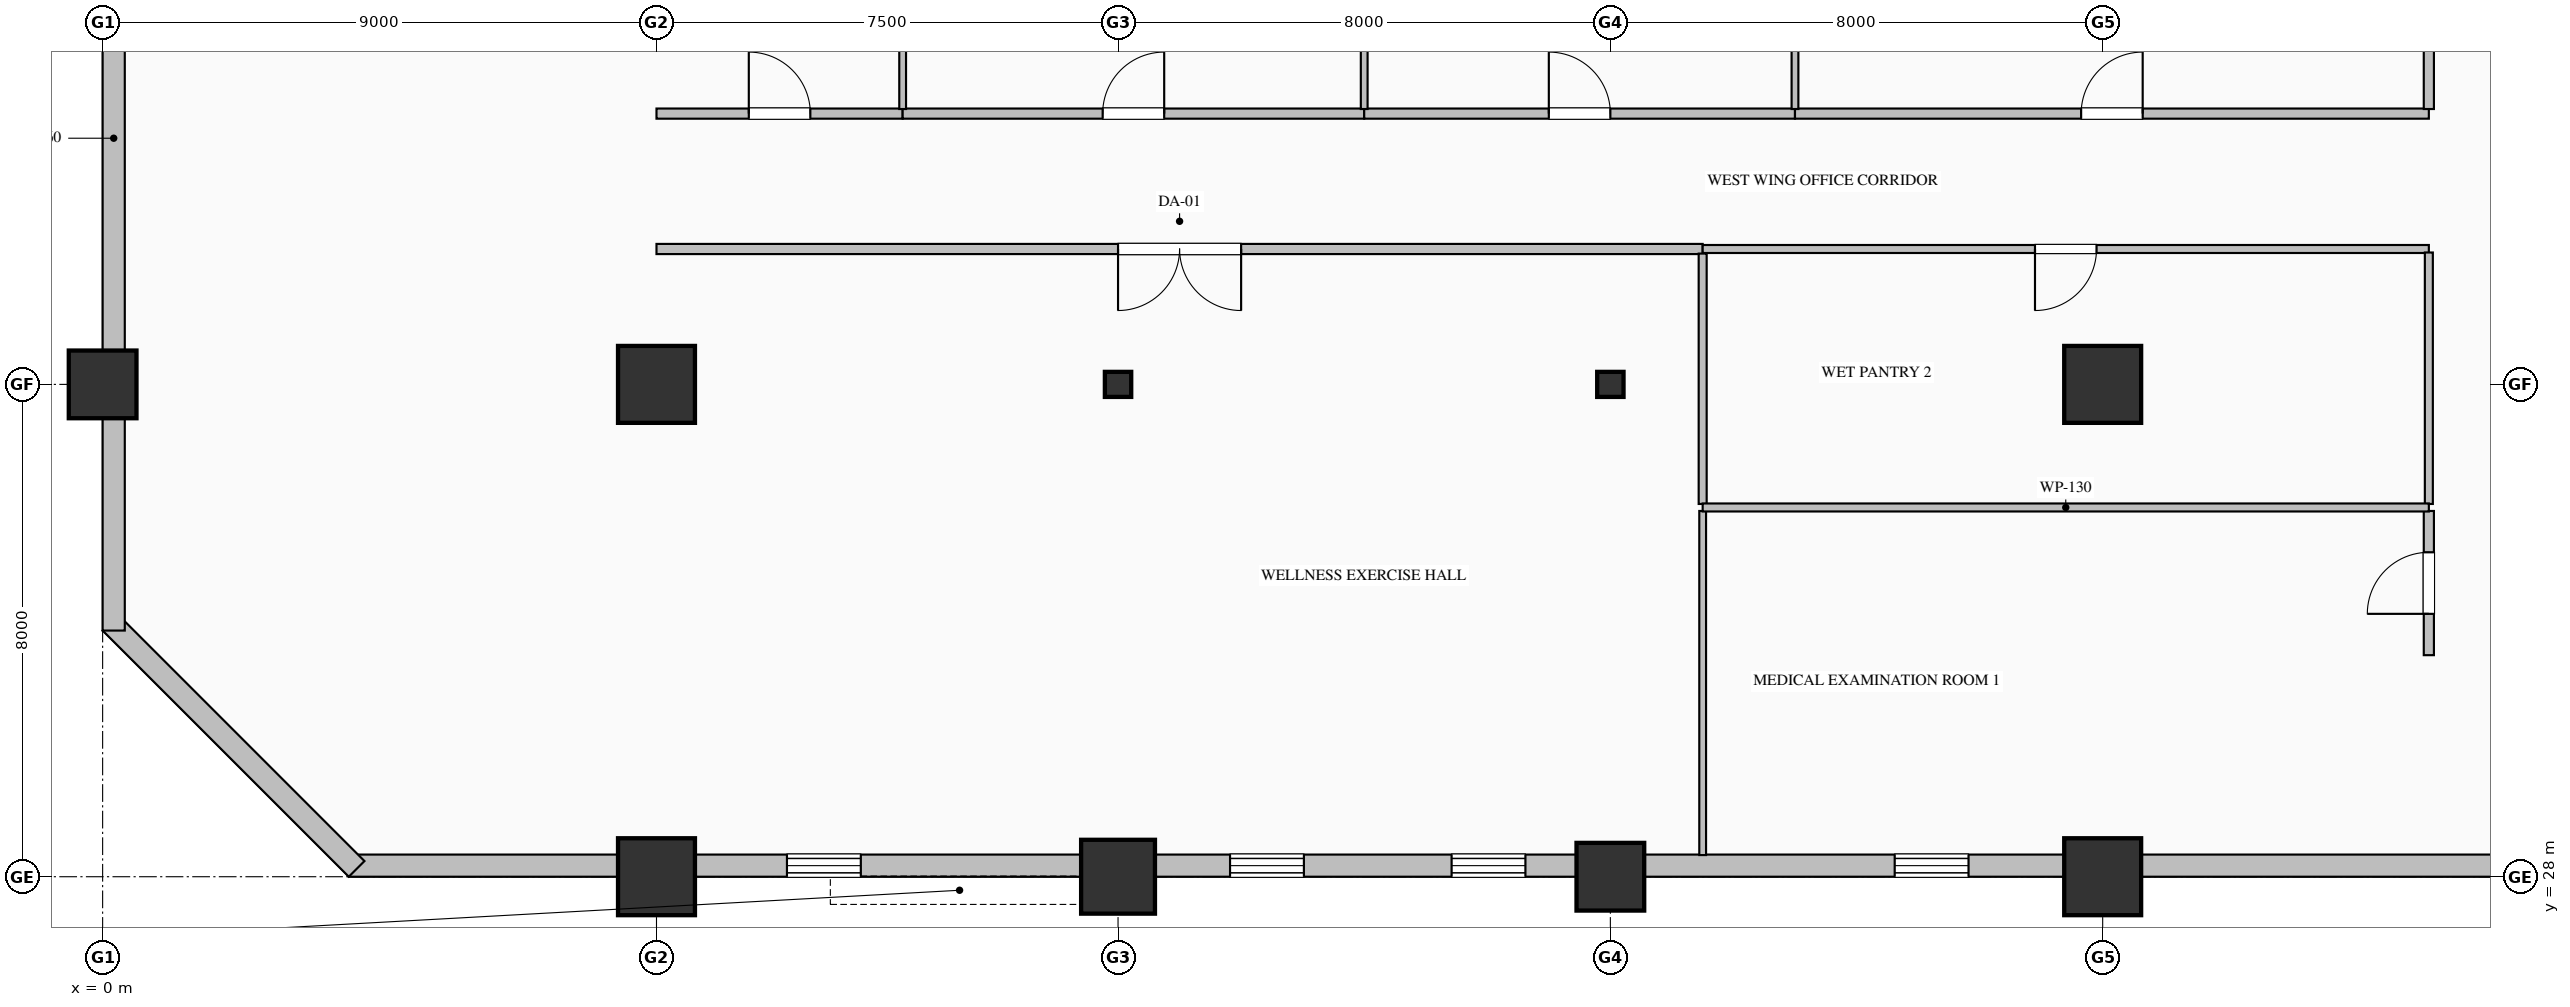
"""IFC4 building model, lengths in metres.
Left out: names, types, materials, properties, quantities, classifications, styles, units other than length and angle.
Written with IfcOpenShell. Run it as: python <this file> out.ifc"""

import sys

from ifc_helpers import new_model, si_unit, direction, frame, frame_2d, origin, origin_2d, place, context, subcontext, project, spatial, rectangle, hollow_rectangle, hollow_circle, i_section, extrude, element, fill, save


model = new_model("IFC4")
c1 = context("Model", 3, precision=1e-05, world=origin(), true_north=direction((0.0, 1.0)))
c2 = subcontext(c1, "Body", "Model", "MODEL_VIEW")
j1 = project(units=[si_unit("LENGTHUNIT", "METRE"), si_unit("PLANEANGLEUNIT", "RADIAN")], contexts=[c1])
p1 = place(None, origin())
s1 = spatial("IfcSite", under=j1, at=p1, CompositionType="ELEMENT")
p2 = place(p1, origin())
s2 = spatial("IfcBuilding", under=s1, at=p2, CompositionType="ELEMENT")
p3 = place(p2, frame((0.0, 0.0, 88.2)))
s3 = spatial("IfcBuildingStorey", under=s2, at=p3, CompositionType="ELEMENT", Elevation=88.2)
p4 = place(p3, frame((0.0, 36.0, 0.0), z_axis=(0.0, 0.0, 1.0), x_axis=(1.0, 0.0, 0.0)))
e1 = element("IfcColumn", 1, at=p4, inside=s3, PredefinedType="COLUMN", context=c2, shape_type="SweptSolid", body=[
    extrude(hollow_rectangle(XDim=1.1, YDim=1.1, WallThickness=0.04, at=origin_2d()), origin(), (0.0, 0.0, 1.0), 4.0),
])
for number, where, z_axis, x_axis in (
    (2, (9.0, 28.0, 0.0), (0.0, 0.0, 1.0), (1.0, 0.0, 0.0)),
    (3, (9.0, 36.0, 0.0), (0.0, 0.0, 1.0), (1.0, 0.0, 0.0)),
):
    element("IfcColumn", number, at=place(p3, frame(where, z_axis=z_axis, x_axis=x_axis)), inside=s3, PredefinedType="COLUMN", context=c2, shape_type="SweptSolid", body=[
        extrude(hollow_rectangle(XDim=1.25, YDim=1.25, WallThickness=0.045, at=origin_2d()), origin(), (0.0, 0.0, 1.0), 4.0),
    ])
p5 = place(p3, frame((16.5, 28.0, 0.0), z_axis=(0.0, 0.0, 1.0), x_axis=(1.0, 0.0, 0.0)))
e4 = element("IfcColumn", 4, at=p5, inside=s3, PredefinedType="COLUMN", context=c2, shape_type="SweptSolid", body=[
    extrude(hollow_circle(Radius=0.6, WallThickness=0.04, at=origin_2d()), origin(), (0.0, 0.0, 1.0), 4.0),
])
p6 = place(p3, frame((16.5, 36.0, 0.0), z_axis=(0.0, 0.0, 1.0), x_axis=(1.0, 0.0, 0.0)))
e5 = element("IfcColumn", 5, at=p6, inside=s3, PredefinedType="COLUMN", context=c2, shape_type="SweptSolid", body=[
    extrude(i_section(OverallWidth=0.407, OverallDepth=0.428, WebThickness=0.02, FlangeThickness=0.035, FilletRadius=0.022, at=origin_2d()), origin(), (0.0, 0.0, 1.0), 4.0),
])
p7 = place(p3, frame((24.5, 28.0, 0.0), z_axis=(0.0, 0.0, 1.0), x_axis=(1.0, 0.0, 0.0)))
e6 = element("IfcColumn", 6, at=p7, inside=s3, PredefinedType="COLUMN", context=c2, shape_type="SweptSolid", body=[
    extrude(hollow_rectangle(XDim=1.1, YDim=1.1, WallThickness=0.04, at=origin_2d()), origin(), (0.0, 0.0, 1.0), 4.0),
])
p8 = place(p3, frame((24.5, 36.0, 0.0), z_axis=(0.0, 0.0, 1.0), x_axis=(1.0, 0.0, 0.0)))
e7 = element("IfcColumn", 7, at=p8, inside=s3, PredefinedType="COLUMN", context=c2, shape_type="SweptSolid", body=[
    extrude(i_section(OverallWidth=0.407, OverallDepth=0.428, WebThickness=0.02, FlangeThickness=0.035, FilletRadius=0.022, at=origin_2d()), origin(), (0.0, 0.0, 1.0), 4.0),
])
for number, where, z_axis, x_axis in (
    (8, (32.5, 28.0, 0.0), (0.0, 0.0, 1.0), (1.0, 0.0, 0.0)),
    (9, (32.5, 36.0, 0.0), (0.0, 0.0, 1.0), (1.0, 0.0, 0.0)),
):
    element("IfcColumn", number, at=place(p3, frame(where, z_axis=z_axis, x_axis=x_axis)), inside=s3, PredefinedType="COLUMN", context=c2, shape_type="SweptSolid", body=[
        extrude(hollow_rectangle(XDim=1.25, YDim=1.25, WallThickness=0.045, at=origin_2d()), origin(), (0.0, 0.0, 1.0), 4.0),
    ])
p9 = place(p3, frame((40.52, 28.18, 0.0), z_axis=(0.0, 0.0, 1.0), x_axis=(-1.0, 0.0, 0.0)))
e10 = element("IfcWall", 10, at=p9, inside=s3, PredefinedType="SOLIDWALL", context=c2, shape_type="SweptSolid", body=[
    extrude(rectangle(XDim=36.52, YDim=0.36, at=frame_2d((18.26, 0.0))), origin(), (0.0, 0.0, 1.0), 3.05),
])
p10 = place(p9, frame((10.2, 0.0, 0.7)))
e11 = element("IfcOpeningElement", 11, at=p10, cuts=e10, PredefinedType="OPENING", context=c2, shape_type="SweptSolid", body=[
    extrude(rectangle(XDim=1.2, YDim=1.85, at=frame_2d((0.6, 0.925))), frame((0.0, 0.19, 0.0), z_axis=(0.0, -1.0, 0.0), x_axis=(1.0, 0.0, 0.0)), (0.0, 0.0, 1.0), 0.38),
])
p11 = place(p9, frame((17.4, 0.0, 0.7)))
e12 = element("IfcOpeningElement", 12, at=p11, cuts=e10, PredefinedType="OPENING", context=c2, shape_type="SweptSolid", body=[
    extrude(rectangle(XDim=1.2, YDim=1.85, at=frame_2d((0.6, 0.925))), frame((0.0, 0.19, 0.0), z_axis=(0.0, -1.0, 0.0), x_axis=(1.0, 0.0, 0.0)), (0.0, 0.0, 1.0), 0.38),
])
p12 = place(p9, frame((21.0, 0.0, 0.7)))
e13 = element("IfcOpeningElement", 13, at=p12, cuts=e10, PredefinedType="OPENING", context=c2, shape_type="SweptSolid", body=[
    extrude(rectangle(XDim=1.2, YDim=1.85, at=frame_2d((0.6, 0.925))), frame((0.0, 0.19, 0.0), z_axis=(0.0, -1.0, 0.0), x_axis=(1.0, 0.0, 0.0)), (0.0, 0.0, 1.0), 0.38),
])
p13 = place(p9, frame((28.2, 0.0, 0.7)))
e14 = element("IfcOpeningElement", 14, at=p13, cuts=e10, PredefinedType="OPENING", context=c2, shape_type="SweptSolid", body=[
    extrude(rectangle(XDim=1.2, YDim=1.85, at=frame_2d((0.6, 0.925))), frame((0.0, 0.19, 0.0), z_axis=(0.0, -1.0, 0.0), x_axis=(1.0, 0.0, 0.0)), (0.0, 0.0, 1.0), 0.38),
])
p14 = place(p3, frame((4.127, 28.127, 0.0), z_axis=(0.0, 0.0, 1.0), x_axis=(-0.707106781187, 0.707106781187, 0.0)))
e15 = element("IfcWall", 15, at=p14, inside=s3, PredefinedType="SOLIDWALL", context=c2, shape_type="SweptSolid", body=[
    extrude(rectangle(XDim=5.657, YDim=0.36, at=frame_2d((2.828, 0.0))), origin(), (0.0, 0.0, 1.0), 3.75),
])
p15 = place(p3, frame((0.18, 32.0, 0.0), z_axis=(0.0, 0.0, 1.0), x_axis=(0.0, 1.0, 0.0)))
e16 = element("IfcWall", 16, at=p15, inside=s3, PredefinedType="SOLIDWALL", context=c2, shape_type="SweptSolid", body=[
    extrude(rectangle(XDim=16.0, YDim=0.36, at=frame_2d((8.0, 0.0))), origin(), (0.0, 0.0, 1.0), 3.25),
])
p16 = place(p3, frame((9.0, 40.4, 0.0), z_axis=(0.0, 0.0, 1.0), x_axis=(1.0, 0.0, 0.0)))
e17 = element("IfcWall", 17, at=p16, inside=s3, PredefinedType="PARTITIONING", context=c2, shape_type="SweptSolid", body=[
    extrude(rectangle(XDim=4.0, YDim=0.165, at=frame_2d((2.0, 0.0))), origin(), (0.0, 0.0, 1.0), 3.75),
])
p17 = place(p16, frame((1.5, 0.0, 0.0)))
e18 = element("IfcOpeningElement", 18, at=p17, cuts=e17, PredefinedType="OPENING", context=c2, shape_type="SweptSolid", body=[
    extrude(rectangle(XDim=1.0, YDim=2.15, at=frame_2d((0.5, 1.075))), frame((0.0, 0.093, 0.0), z_axis=(0.0, -1.0, 0.0), x_axis=(1.0, 0.0, 0.0)), (0.0, 0.0, 1.0), 0.185),
])
p18 = place(p3, frame((13.0, 40.4, 0.0), z_axis=(0.0, 0.0, 1.0), x_axis=(1.0, 0.0, 0.0)))
e19 = element("IfcWall", 19, at=p18, inside=s3, PredefinedType="PARTITIONING", context=c2, shape_type="SweptSolid", body=[
    extrude(rectangle(XDim=7.5, YDim=0.165, at=frame_2d((3.75, 0.0))), origin(), (0.0, 0.0, 1.0), 3.75),
])
p19 = place(p18, frame((3.25, 0.0, 0.0)))
e20 = element("IfcOpeningElement", 20, at=p19, cuts=e19, PredefinedType="OPENING", context=c2, shape_type="SweptSolid", body=[
    extrude(rectangle(XDim=1.0, YDim=2.15, at=frame_2d((0.5, 1.075))), frame((0.0, 0.093, 0.0), z_axis=(0.0, -1.0, 0.0), x_axis=(1.0, 0.0, 0.0)), (0.0, 0.0, 1.0), 0.185),
])
p20 = place(p3, frame((20.5, 40.4, 0.0), z_axis=(0.0, 0.0, 1.0), x_axis=(1.0, 0.0, 0.0)))
e21 = element("IfcWall", 21, at=p20, inside=s3, PredefinedType="PARTITIONING", context=c2, shape_type="SweptSolid", body=[
    extrude(rectangle(XDim=7.0, YDim=0.165, at=frame_2d((3.5, 0.0))), origin(), (0.0, 0.0, 1.0), 3.75),
])
p21 = place(p20, frame((3.0, 0.0, 0.0)))
e22 = element("IfcOpeningElement", 22, at=p21, cuts=e21, PredefinedType="OPENING", context=c2, shape_type="SweptSolid", body=[
    extrude(rectangle(XDim=1.0, YDim=2.15, at=frame_2d((0.5, 1.075))), frame((0.0, 0.093, 0.0), z_axis=(0.0, -1.0, 0.0), x_axis=(1.0, 0.0, 0.0)), (0.0, 0.0, 1.0), 0.185),
])
p22 = place(p3, frame((27.5, 40.4, 0.0), z_axis=(0.0, 0.0, 1.0), x_axis=(1.0, 0.0, 0.0)))
e23 = element("IfcWall", 23, at=p22, inside=s3, PredefinedType="PARTITIONING", context=c2, shape_type="SweptSolid", body=[
    extrude(rectangle(XDim=10.3, YDim=0.165, at=frame_2d((5.15, 0.0))), origin(), (0.0, 0.0, 1.0), 3.75),
])
p23 = place(p22, frame((4.65, 0.0, 0.0)))
e24 = element("IfcOpeningElement", 24, at=p23, cuts=e23, PredefinedType="OPENING", context=c2, shape_type="SweptSolid", body=[
    extrude(rectangle(XDim=1.0, YDim=2.15, at=frame_2d((0.5, 1.075))), frame((0.0, 0.093, 0.0), z_axis=(0.0, -1.0, 0.0), x_axis=(1.0, 0.0, 0.0)), (0.0, 0.0, 1.0), 0.185),
])
p24 = place(p3, frame((26.0, 38.2, 0.0), z_axis=(0.0, 0.0, 1.0), x_axis=(-1.0, 0.0, 0.0)))
e25 = element("IfcWall", 25, at=p24, inside=s3, PredefinedType="PARTITIONING", context=c2, shape_type="SweptSolid", body=[
    extrude(rectangle(XDim=17.0, YDim=0.165, at=frame_2d((8.5, 0.0))), origin(), (0.0, 0.0, 1.0), 3.75),
])
p25 = place(p24, frame((7.5, 0.0, 0.0)))
e26 = element("IfcOpeningElement", 26, at=p25, cuts=e25, PredefinedType="OPENING", context=c2, shape_type="SweptSolid", body=[
    extrude(rectangle(XDim=2.0, YDim=2.4, at=frame_2d((1.0, 1.2))), frame((0.0, 0.093, 0.0), z_axis=(0.0, -1.0, 0.0), x_axis=(1.0, 0.0, 0.0)), (0.0, 0.0, 1.0), 0.185),
])
p26 = place(p3, frame((37.8, 38.2, 0.0), z_axis=(0.0, 0.0, 1.0), x_axis=(-1.0, 0.0, 0.0)))
e27 = element("IfcWall", 27, at=p26, inside=s3, PredefinedType="PARTITIONING", context=c2, shape_type="SweptSolid", body=[
    extrude(rectangle(XDim=11.8, YDim=0.13, at=frame_2d((5.9, 0.0))), origin(), (0.0, 0.0, 1.0), 3.75),
])
p27 = place(p26, frame((5.4, 0.0, 0.0)))
e28 = element("IfcOpeningElement", 28, at=p27, cuts=e27, PredefinedType="OPENING", context=c2, shape_type="SweptSolid", body=[
    extrude(rectangle(XDim=1.0, YDim=2.15, at=frame_2d((0.5, 1.075))), frame((0.0, 0.075, 0.0), z_axis=(0.0, -1.0, 0.0), x_axis=(1.0, 0.0, 0.0)), (0.0, 0.0, 1.0), 0.15),
])
p28 = place(p3, frame((37.8, 40.475, 0.0), z_axis=(0.0, 0.0, 1.0), x_axis=(0.0, 1.0, 0.0)))
e29 = element("IfcWall", 29, at=p28, inside=s3, PredefinedType="PARTITIONING", context=c2, shape_type="SweptSolid", body=[
    extrude(rectangle(XDim=3.651, YDim=0.165, at=frame_2d((1.825, 0.0))), origin(), (0.0, 0.0, 1.0), 3.75),
])
p29 = place(p3, frame((37.8, 31.6, 0.0), z_axis=(0.0, 0.0, 1.0), x_axis=(0.0, 1.0, 0.0)))
e30 = element("IfcWall", 30, at=p29, inside=s3, PredefinedType="PARTITIONING", context=c2, shape_type="SweptSolid", body=[
    extrude(rectangle(XDim=2.343, YDim=0.165, at=frame_2d((1.171, 0.0))), origin(), (0.0, 0.0, 1.0), 3.75),
])
p30 = place(p29, frame((0.671, 0.0, 0.0)))
e31 = element("IfcOpeningElement", 31, at=p30, cuts=e30, PredefinedType="OPENING", context=c2, shape_type="SweptSolid", body=[
    extrude(rectangle(XDim=1.0, YDim=2.15, at=frame_2d((0.5, 1.075))), frame((0.0, 0.093, 0.0), z_axis=(0.0, -1.0, 0.0), x_axis=(1.0, 0.0, 0.0)), (0.0, 0.0, 1.0), 0.185),
])
p31 = place(p3, frame((37.8, 34.057, 0.0), z_axis=(0.0, 0.0, 1.0), x_axis=(0.0, 1.0, 0.0)))
e32 = element("IfcWall", 32, at=p31, inside=s3, PredefinedType="PARTITIONING", context=c2, shape_type="SweptSolid", body=[
    extrude(rectangle(XDim=4.086, YDim=0.13, at=frame_2d((2.043, 0.0))), origin(), (0.0, 0.0, 1.0), 3.75),
])
for number, where, z_axis, x_axis in (
    (33, (13.0, 51.648, 0.0), (0.0, 0.0, 1.0), (0.0, -1.0, 0.0)),
    (34, (20.5, 51.648, 0.0), (0.0, 0.0, 1.0), (0.0, -1.0, 0.0)),
    (35, (27.5, 51.648, 0.0), (0.0, 0.0, 1.0), (0.0, -1.0, 0.0)),
):
    element("IfcWall", number, at=place(p3, frame(where, z_axis=z_axis, x_axis=x_axis)), inside=s3, PredefinedType="MOVABLE", context=c2, shape_type="SweptSolid", body=[
        extrude(rectangle(XDim=11.173, YDim=0.11, at=frame_2d((5.587, 0.0))), origin(), (0.0, 0.0, 1.0), 3.75),
    ])
p32 = place(p3, frame((26.0, 33.943, 0.0), z_axis=(0.0, 0.0, 1.0), x_axis=(0.0, -1.0, 0.0)))
e36 = element("IfcWall", 36, at=p32, inside=s3, PredefinedType="MOVABLE", context=c2, shape_type="SweptSolid", body=[
    extrude(rectangle(XDim=5.591, YDim=0.11, at=frame_2d((2.795, 0.0))), origin(), (0.0, 0.0, 1.0), 3.75),
])
p33 = place(p3, frame((26.0, 38.125, 0.0), z_axis=(0.0, 0.0, 1.0), x_axis=(0.0, -1.0, 0.0)))
e37 = element("IfcWall", 37, at=p33, inside=s3, PredefinedType="PARTITIONING", context=c2, shape_type="SweptSolid", body=[
    extrude(rectangle(XDim=4.069, YDim=0.13, at=frame_2d((2.034, 0.0))), origin(), (0.0, 0.0, 1.0), 3.75),
])
p34 = place(p3, frame((26.0, 34.0, 0.0), z_axis=(0.0, 0.0, 1.0), x_axis=(1.0, 0.0, 0.0)))
e38 = element("IfcWall", 38, at=p34, inside=s3, PredefinedType="PARTITIONING", context=c2, shape_type="SweptSolid", body=[
    extrude(rectangle(XDim=11.8, YDim=0.13, at=frame_2d((5.9, 0.0))), origin(), (0.0, 0.0, 1.0), 3.75),
])
p35 = place(p10, origin())
e39 = element("IfcWindow", 39, at=p35, inside=s3, PartitioningType="DOUBLE_PANEL_VERTICAL", PredefinedType="WINDOW", context=c2, shape_type="SweptSolid", body=[
    extrude(rectangle(XDim=1.2, YDim=1.85, at=frame_2d((0.6, 0.925))), frame((0.0, 0.15, 0.0), z_axis=(0.0, -1.0, 0.0), x_axis=(1.0, 0.0, 0.0)), (0.0, 0.0, 1.0), 0.06),
])
fill(e11, e39)
p36 = place(p11, origin())
e40 = element("IfcWindow", 40, at=p36, inside=s3, PartitioningType="DOUBLE_PANEL_VERTICAL", PredefinedType="WINDOW", context=c2, shape_type="SweptSolid", body=[
    extrude(rectangle(XDim=1.2, YDim=1.85, at=frame_2d((0.6, 0.925))), frame((0.0, 0.15, 0.0), z_axis=(0.0, -1.0, 0.0), x_axis=(1.0, 0.0, 0.0)), (0.0, 0.0, 1.0), 0.06),
])
fill(e12, e40)
p37 = place(p12, origin())
e41 = element("IfcWindow", 41, at=p37, inside=s3, PartitioningType="DOUBLE_PANEL_VERTICAL", PredefinedType="WINDOW", context=c2, shape_type="SweptSolid", body=[
    extrude(rectangle(XDim=1.2, YDim=1.85, at=frame_2d((0.6, 0.925))), frame((0.0, 0.15, 0.0), z_axis=(0.0, -1.0, 0.0), x_axis=(1.0, 0.0, 0.0)), (0.0, 0.0, 1.0), 0.06),
])
fill(e13, e41)
p38 = place(p13, origin())
e42 = element("IfcWindow", 42, at=p38, inside=s3, PartitioningType="DOUBLE_PANEL_VERTICAL", PredefinedType="WINDOW", context=c2, shape_type="SweptSolid", body=[
    extrude(rectangle(XDim=1.2, YDim=1.85, at=frame_2d((0.6, 0.925))), frame((0.0, 0.15, 0.0), z_axis=(0.0, -1.0, 0.0), x_axis=(1.0, 0.0, 0.0)), (0.0, 0.0, 1.0), 0.06),
])
fill(e14, e42)
p39 = place(p17, origin())
e43 = element("IfcDoor", 43, at=p39, inside=s3, OperationType="SINGLE_SWING_LEFT", PredefinedType="DOOR", context=c2, shape_type="SweptSolid", body=[
    extrude(rectangle(XDim=1.0, YDim=2.15, at=frame_2d((0.5, 1.075))), frame((0.0, 0.025, 0.0), z_axis=(0.0, -1.0, 0.0), x_axis=(1.0, 0.0, 0.0)), (0.0, 0.0, 1.0), 0.05),
])
fill(e18, e43)
p40 = place(p19, origin())
e44 = element("IfcDoor", 44, at=p40, inside=s3, OperationType="SINGLE_SWING_RIGHT", PredefinedType="DOOR", context=c2, shape_type="SweptSolid", body=[
    extrude(rectangle(XDim=1.0, YDim=2.15, at=frame_2d((0.5, 1.075))), frame((0.0, 0.025, 0.0), z_axis=(0.0, -1.0, 0.0), x_axis=(1.0, 0.0, 0.0)), (0.0, 0.0, 1.0), 0.05),
])
fill(e20, e44)
p41 = place(p21, origin())
e45 = element("IfcDoor", 45, at=p41, inside=s3, OperationType="SINGLE_SWING_LEFT", PredefinedType="DOOR", context=c2, shape_type="SweptSolid", body=[
    extrude(rectangle(XDim=1.0, YDim=2.15, at=frame_2d((0.5, 1.075))), frame((0.0, 0.025, 0.0), z_axis=(0.0, -1.0, 0.0), x_axis=(1.0, 0.0, 0.0)), (0.0, 0.0, 1.0), 0.05),
])
fill(e22, e45)
p42 = place(p23, origin())
e46 = element("IfcDoor", 46, at=p42, inside=s3, OperationType="SINGLE_SWING_RIGHT", PredefinedType="DOOR", context=c2, shape_type="SweptSolid", body=[
    extrude(rectangle(XDim=1.0, YDim=2.15, at=frame_2d((0.5, 1.075))), frame((0.0, 0.025, 0.0), z_axis=(0.0, -1.0, 0.0), x_axis=(1.0, 0.0, 0.0)), (0.0, 0.0, 1.0), 0.05),
])
fill(e24, e46)
p43 = place(p25, origin())
e47 = element("IfcDoor", 47, at=p43, inside=s3, OperationType="DOUBLE_DOOR_SINGLE_SWING", PredefinedType="DOOR", context=c2, shape_type="SweptSolid", body=[
    extrude(rectangle(XDim=2.0, YDim=2.4, at=frame_2d((1.0, 1.2))), frame((0.0, 0.025, 0.0), z_axis=(0.0, -1.0, 0.0), x_axis=(1.0, 0.0, 0.0)), (0.0, 0.0, 1.0), 0.05),
])
fill(e26, e47)
p44 = place(p30, origin())
e48 = element("IfcDoor", 48, at=p44, inside=s3, OperationType="SINGLE_SWING_LEFT", PredefinedType="DOOR", context=c2, shape_type="SweptSolid", body=[
    extrude(rectangle(XDim=1.0, YDim=2.15, at=frame_2d((0.5, 1.075))), frame((0.0, 0.025, 0.0), z_axis=(0.0, -1.0, 0.0), x_axis=(1.0, 0.0, 0.0)), (0.0, 0.0, 1.0), 0.05),
])
fill(e31, e48)
p45 = place(p27, origin())
e49 = element("IfcDoor", 49, at=p45, inside=s3, OperationType="SINGLE_SWING_RIGHT", PredefinedType="DOOR", context=c2, shape_type="SweptSolid", body=[
    extrude(rectangle(XDim=1.0, YDim=2.15, at=frame_2d((0.5, 1.075))), frame((0.0, 0.025, 0.0), z_axis=(0.0, -1.0, 0.0), x_axis=(1.0, 0.0, 0.0)), (0.0, 0.0, 1.0), 0.05),
])
fill(e28, e49)
save(model, sys.argv[1])
